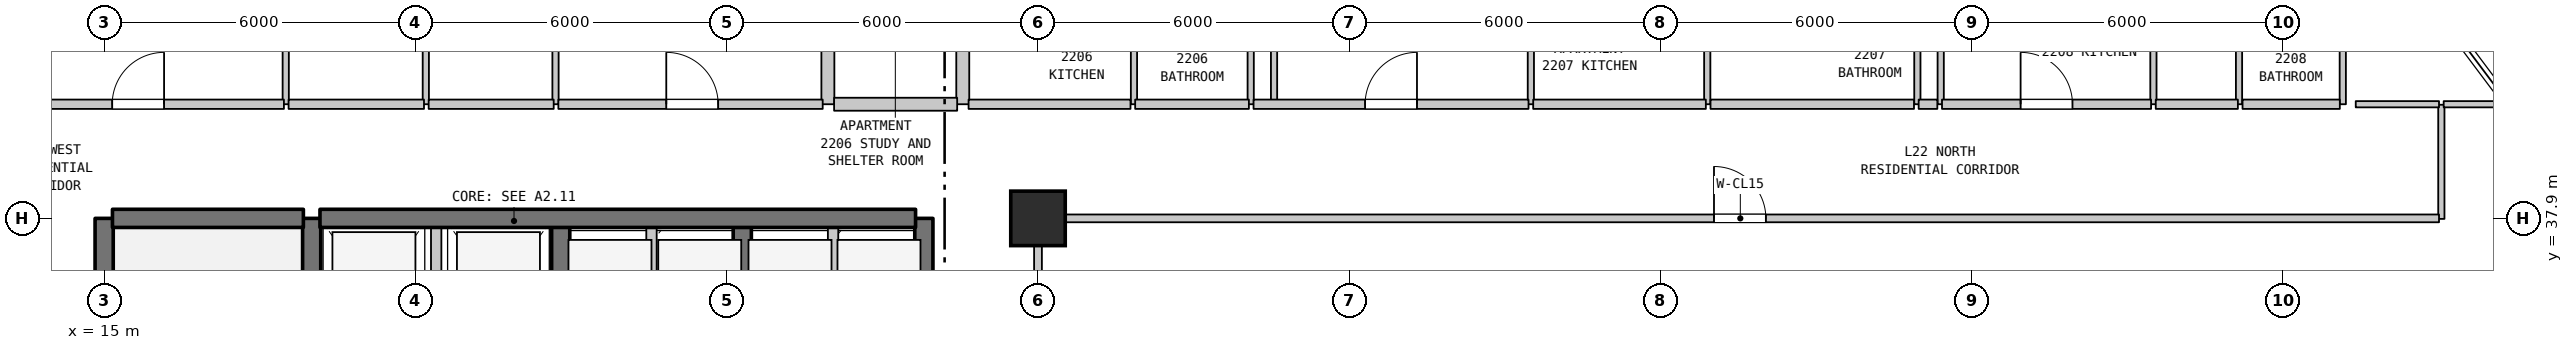
"""IFC4 building model, lengths in metres.
Left out: names, types, materials, properties, quantities, classifications, styles, units other than length and angle.
Written with IfcOpenShell. Run it as: python <this file> out.ifc"""

import sys

from ifc_helpers import new_model, si_unit, direction, frame, frame_2d, origin, origin_2d, place, context, subcontext, project, spatial, rectangle, extrude, element, fill, save


model = new_model("IFC4")
c1 = context("Model", 3, precision=1e-05, world=origin(), true_north=direction((0.0, 1.0)))
c2 = subcontext(c1, "Body", "Model", "MODEL_VIEW")
j1 = project(units=[si_unit("LENGTHUNIT", "METRE"), si_unit("PLANEANGLEUNIT", "RADIAN")], contexts=[c1])
p1 = place(None, origin())
s1 = spatial("IfcSite", under=j1, at=p1, CompositionType="ELEMENT")
p2 = place(p1, origin())
s2 = spatial("IfcBuilding", under=s1, at=p2, CompositionType="ELEMENT")
p3 = place(p2, frame((0.0, 0.0, 94.6)))
s3 = spatial("IfcBuildingStorey", under=s2, at=p3, CompositionType="ELEMENT", Elevation=94.6)
p4 = place(p3, frame((33.0, 37.9, 0.0), z_axis=(0.0, 0.0, 1.0), x_axis=(1.0, 0.0, 0.0)))
e1 = element("IfcColumn", 1, at=p4, inside=s3, PredefinedType="COLUMN", context=c2, shape_type="SweptSolid", body=[
    extrude(rectangle(XDim=1.05, YDim=1.05, at=origin_2d()), origin(), (0.0, 0.0, 1.0), 3.7),
])
p5 = place(p3, frame((15.0, 31.1, 0.0), z_axis=(0.0, 0.0, 1.0), x_axis=(0.0, 1.0, 0.0)))
e2 = element("IfcWall", 2, at=p5, inside=s3, PredefinedType="SHEAR", context=c2, shape_type="SweptSolid", body=[
    extrude(rectangle(XDim=6.8, YDim=0.35, at=frame_2d((3.4, 0.0))), origin(), (0.0, 0.0, 1.0), 3.385),
])
p6 = place(p3, frame((18.5, 40.1, 0.0), z_axis=(0.0, 0.0, 1.0), x_axis=(0.0, 1.0, 0.0)))
e3 = element("IfcWall", 3, at=p6, inside=s3, PredefinedType="PARTITIONING", context=c2, shape_type="SweptSolid", body=[
    extrude(rectangle(XDim=3.2, YDim=0.12, at=frame_2d((1.6, 0.0))), origin(), (0.0, 0.0, 1.0), 3.385),
])
p7 = place(p3, frame((19.0, 35.0, 0.0), z_axis=(0.0, 0.0, 1.0), x_axis=(0.0, 1.0, 0.0)))
e4 = element("IfcWall", 4, at=p7, inside=s3, PredefinedType="SHEAR", context=c2, shape_type="SweptSolid", body=[
    extrude(rectangle(XDim=2.9, YDim=0.35, at=frame_2d((1.45, 0.0))), origin(), (0.0, 0.0, 1.0), 3.385),
])
p8 = place(p3, frame((21.2, 40.1, 0.0), z_axis=(0.0, 0.0, 1.0), x_axis=(0.0, 1.0, 0.0)))
e5 = element("IfcWall", 5, at=p8, inside=s3, PredefinedType="PARTITIONING", context=c2, shape_type="SweptSolid", body=[
    extrude(rectangle(XDim=3.2, YDim=0.12, at=frame_2d((1.6, 0.0))), origin(), (0.0, 0.0, 1.0), 3.385),
])
p9 = place(p8, frame((1.15, 0.0, 0.0)))
e6 = element("IfcOpeningElement", 6, at=p9, cuts=e5, PredefinedType="OPENING", context=c2, shape_type="SweptSolid", body=[
    extrude(rectangle(XDim=0.9, YDim=2.15, at=frame_2d((0.45, 1.075))), frame((0.0, 0.07, 0.0), z_axis=(0.0, -1.0, 0.0), x_axis=(1.0, 0.0, 0.0)), (0.0, 0.0, 1.0), 0.14),
])
p10 = place(p3, frame((21.4, 35.0, 0.0), z_axis=(0.0, 0.0, 1.0), x_axis=(0.0, 1.0, 0.0)))
e7 = element("IfcWall", 7, at=p10, inside=s3, PredefinedType="STANDARD", context=c2, shape_type="SweptSolid", body=[
    extrude(rectangle(XDim=2.9, YDim=0.2, at=frame_2d((1.45, 0.0))), origin(), (0.0, 0.0, 1.0), 3.385),
])
p11 = place(p3, frame((23.7, 40.1, 0.0), z_axis=(0.0, 0.0, 1.0), x_axis=(0.0, 1.0, 0.0)))
e8 = element("IfcWall", 8, at=p11, inside=s3, PredefinedType="PARTITIONING", context=c2, shape_type="SweptSolid", body=[
    extrude(rectangle(XDim=2.05, YDim=0.12, at=frame_2d((1.025, 0.0))), origin(), (0.0, 0.0, 1.0), 3.385),
])
p12 = place(p3, frame((23.8, 35.0, 0.0), z_axis=(0.0, 0.0, 1.0), x_axis=(0.0, 1.0, 0.0)))
e9 = element("IfcWall", 9, at=p12, inside=s3, PredefinedType="SHEAR", context=c2, shape_type="SweptSolid", body=[
    extrude(rectangle(XDim=2.9, YDim=0.35, at=frame_2d((1.45, 0.0))), origin(), (0.0, 0.0, 1.0), 3.385),
])
p13 = place(p3, frame((25.55, 35.0, 0.0), z_axis=(0.0, 0.0, 1.0), x_axis=(0.0, 1.0, 0.0)))
e10 = element("IfcWall", 10, at=p13, inside=s3, PredefinedType="STANDARD", context=c2, shape_type="SweptSolid", body=[
    extrude(rectangle(XDim=2.9, YDim=0.2, at=frame_2d((1.45, 0.0))), origin(), (0.0, 0.0, 1.0), 3.385),
])
p14 = place(p3, frame((27.3, 35.0, 0.0), z_axis=(0.0, 0.0, 1.0), x_axis=(0.0, 1.0, 0.0)))
e11 = element("IfcWall", 11, at=p14, inside=s3, PredefinedType="SHEAR", context=c2, shape_type="SweptSolid", body=[
    extrude(rectangle(XDim=2.9, YDim=0.35, at=frame_2d((1.45, 0.0))), origin(), (0.0, 0.0, 1.0), 3.385),
])
p15 = place(p3, frame((28.95, 40.1, 0.0), z_axis=(0.0, 0.0, 1.0), x_axis=(0.0, 1.0, 0.0)))
e12 = element("IfcWall", 12, at=p15, inside=s3, PredefinedType="STANDARD", context=c2, shape_type="SweptSolid", body=[
    extrude(rectangle(XDim=2.3, YDim=0.25, at=frame_2d((1.15, 0.0))), origin(), (0.0, 0.0, 1.0), 3.385),
])
p16 = place(p3, frame((29.05, 35.0, 0.0), z_axis=(0.0, 0.0, 1.0), x_axis=(0.0, 1.0, 0.0)))
e13 = element("IfcWall", 13, at=p16, inside=s3, PredefinedType="STANDARD", context=c2, shape_type="SweptSolid", body=[
    extrude(rectangle(XDim=2.9, YDim=0.2, at=frame_2d((1.45, 0.0))), origin(), (0.0, 0.0, 1.0), 3.385),
])
p17 = place(p3, frame((30.8, 35.0, 0.0), z_axis=(0.0, 0.0, 1.0), x_axis=(0.0, 1.0, 0.0)))
e14 = element("IfcWall", 14, at=p17, inside=s3, PredefinedType="SHEAR", context=c2, shape_type="SweptSolid", body=[
    extrude(rectangle(XDim=2.9, YDim=0.35, at=frame_2d((1.45, 0.0))), origin(), (0.0, 0.0, 1.0), 3.385),
])
p18 = place(p3, frame((31.55, 40.1, 0.0), z_axis=(0.0, 0.0, 1.0), x_axis=(0.0, 1.0, 0.0)))
e15 = element("IfcWall", 15, at=p18, inside=s3, PredefinedType="STANDARD", context=c2, shape_type="SweptSolid", body=[
    extrude(rectangle(XDim=2.3, YDim=0.25, at=frame_2d((1.15, 0.0))), origin(), (0.0, 0.0, 1.0), 3.385),
])
p19 = place(p3, frame((33.0, 27.91, 0.0), z_axis=(0.0, 0.0, 1.0), x_axis=(0.0, 1.0, 0.0)))
e16 = element("IfcWall", 16, at=p19, inside=s3, PredefinedType="STANDARD", context=c2, shape_type="SweptSolid", body=[
    extrude(rectangle(XDim=9.98, YDim=0.15, at=frame_2d((4.99, 0.0))), origin(), (0.0, 0.0, 1.0), 2.885),
])
for number, where, z_axis, x_axis in (
    (17, (34.85, 40.1, 0.0), (0.0, 0.0, 1.0), (0.0, 1.0, 0.0)),
    (18, (37.1, 40.1, 0.0), (0.0, 0.0, 1.0), (0.0, 1.0, 0.0)),
):
    element("IfcWall", number, at=place(p3, frame(where, z_axis=z_axis, x_axis=x_axis)), inside=s3, PredefinedType="PARTITIONING", context=c2, shape_type="SweptSolid", body=[
        extrude(rectangle(XDim=2.3, YDim=0.12, at=frame_2d((1.15, 0.0))), origin(), (0.0, 0.0, 1.0), 3.385),
    ])
p20 = place(p3, frame((37.55, 40.1, 0.0), z_axis=(0.0, 0.0, 1.0), x_axis=(0.0, 1.0, 0.0)))
e19 = element("IfcWall", 19, at=p20, inside=s3, PredefinedType="PARTITIONING", context=c2, shape_type="SweptSolid", body=[
    extrude(rectangle(XDim=2.05, YDim=0.12, at=frame_2d((1.025, 0.0))), origin(), (0.0, 0.0, 1.0), 3.385),
])
for number, where, z_axis, x_axis in (
    (20, (42.5, 40.1, 0.0), (0.0, 0.0, 1.0), (0.0, 1.0, 0.0)),
    (21, (45.9, 40.1, 0.0), (0.0, 0.0, 1.0), (0.0, 1.0, 0.0)),
    (22, (49.95, 40.1, 0.0), (0.0, 0.0, 1.0), (0.0, 1.0, 0.0)),
):
    element("IfcWall", number, at=place(p3, frame(where, z_axis=z_axis, x_axis=x_axis)), inside=s3, PredefinedType="PARTITIONING", context=c2, shape_type="SweptSolid", body=[
        extrude(rectangle(XDim=2.3, YDim=0.12, at=frame_2d((1.15, 0.0))), origin(), (0.0, 0.0, 1.0), 3.385),
    ])
p21 = place(p3, frame((50.4, 40.1, 0.0), z_axis=(0.0, 0.0, 1.0), x_axis=(0.0, 1.0, 0.0)))
e23 = element("IfcWall", 23, at=p21, inside=s3, PredefinedType="PARTITIONING", context=c2, shape_type="SweptSolid", body=[
    extrude(rectangle(XDim=5.35, YDim=0.12, at=frame_2d((2.675, 0.0))), origin(), (0.0, 0.0, 1.0), 3.385),
])
for number, where, z_axis, x_axis in (
    (24, (54.5, 40.1, 0.0), (0.0, 0.0, 1.0), (0.0, 1.0, 0.0)),
    (25, (56.15, 40.1, 0.0), (0.0, 0.0, 1.0), (0.0, 1.0, 0.0)),
    (26, (58.15, 40.1, 0.0), (0.0, 0.0, 1.0), (0.0, 1.0, 0.0)),
):
    element("IfcWall", number, at=place(p3, frame(where, z_axis=z_axis, x_axis=x_axis)), inside=s3, PredefinedType="PARTITIONING", context=c2, shape_type="SweptSolid", body=[
        extrude(rectangle(XDim=2.3, YDim=0.12, at=frame_2d((1.15, 0.0))), origin(), (0.0, 0.0, 1.0), 3.385),
    ])
p22 = place(p3, frame((60.05, 37.89, 0.0), z_axis=(0.0, 0.0, 1.0), x_axis=(0.0, 1.0, 0.0)))
e27 = element("IfcWall", 27, at=p22, inside=s3, PredefinedType="PARTITIONING", context=c2, shape_type="SweptSolid", body=[
    extrude(rectangle(XDim=2.2, YDim=0.12, at=frame_2d((1.1, 0.0))), origin(), (0.0, 0.0, 1.0), 3.385),
])
p23 = place(p3, frame((15.16, 37.9, 0.0), z_axis=(0.0, 0.0, 1.0), x_axis=(1.0, 0.0, 0.0)))
e28 = element("IfcWall", 28, at=p23, inside=s3, PredefinedType="SHEAR", context=c2, shape_type="SweptSolid", body=[
    extrude(rectangle(XDim=3.68, YDim=0.35, at=frame_2d((1.84, 0.0))), origin(), (0.0, 0.0, 1.0), 3.385),
])
p24 = place(p3, frame((19.16, 37.9, 0.0), z_axis=(0.0, 0.0, 1.0), x_axis=(1.0, 0.0, 0.0)))
e29 = element("IfcWall", 29, at=p24, inside=s3, PredefinedType="SHEAR", context=c2, shape_type="SweptSolid", body=[
    extrude(rectangle(XDim=11.48, YDim=0.35, at=frame_2d((5.74, 0.0))), origin(), (0.0, 0.0, 1.0), 3.385),
])
p25 = place(p3, frame((33.07, 37.9, 0.0), z_axis=(0.0, 0.0, 1.0), x_axis=(1.0, 0.0, 0.0)))
e30 = element("IfcWall", 30, at=p25, inside=s3, PredefinedType="STANDARD", context=c2, shape_type="SweptSolid", body=[
    extrude(rectangle(XDim=26.935, YDim=0.15, at=frame_2d((13.467, 0.0))), origin(), (0.0, 0.0, 1.0), 3.385),
])
p26 = place(p25, frame((12.96, 0.0, 0.0)))
e31 = element("IfcOpeningElement", 31, at=p26, cuts=e30, PredefinedType="OPENING", context=c2, shape_type="SweptSolid", body=[
    extrude(rectangle(XDim=1.0, YDim=2.15, at=frame_2d((0.5, 1.075))), frame((0.0, 0.085, 0.0), z_axis=(0.0, -1.0, 0.0), x_axis=(1.0, 0.0, 0.0)), (0.0, 0.0, 1.0), 0.17),
])
p27 = place(p3, frame((12.875, 40.1, 0.0), z_axis=(0.0, 0.0, 1.0), x_axis=(1.0, 0.0, 0.0)))
e32 = element("IfcWall", 32, at=p27, inside=s3, PredefinedType="STANDARD", context=c2, shape_type="SweptSolid", body=[
    extrude(rectangle(XDim=5.59, YDim=0.18, at=frame_2d((2.795, 0.0))), origin(), (0.0, 0.0, 1.0), 3.385),
])
p28 = place(p27, frame((2.28, 0.0, 0.0)))
e33 = element("IfcOpeningElement", 33, at=p28, cuts=e32, PredefinedType="OPENING", context=c2, shape_type="SweptSolid", body=[
    extrude(rectangle(XDim=1.0, YDim=2.15, at=frame_2d((0.5, 1.075))), frame((0.0, 0.1, 0.0), z_axis=(0.0, -1.0, 0.0), x_axis=(1.0, 0.0, 0.0)), (0.0, 0.0, 1.0), 0.2),
])
p29 = place(p3, frame((18.555, 40.1, 0.0), z_axis=(0.0, 0.0, 1.0), x_axis=(1.0, 0.0, 0.0)))
e34 = element("IfcWall", 34, at=p29, inside=s3, PredefinedType="STANDARD", context=c2, shape_type="SweptSolid", body=[
    extrude(rectangle(XDim=2.61, YDim=0.18, at=frame_2d((1.305, 0.0))), origin(), (0.0, 0.0, 1.0), 3.385),
])
p30 = place(p3, frame((21.255, 40.1, 0.0), z_axis=(0.0, 0.0, 1.0), x_axis=(1.0, 0.0, 0.0)))
e35 = element("IfcWall", 35, at=p30, inside=s3, PredefinedType="STANDARD", context=c2, shape_type="SweptSolid", body=[
    extrude(rectangle(XDim=2.41, YDim=0.18, at=frame_2d((1.205, 0.0))), origin(), (0.0, 0.0, 1.0), 3.385),
])
p31 = place(p3, frame((23.755, 40.1, 0.0), z_axis=(0.0, 0.0, 1.0), x_axis=(1.0, 0.0, 0.0)))
e36 = element("IfcWall", 36, at=p31, inside=s3, PredefinedType="STANDARD", context=c2, shape_type="SweptSolid", body=[
    extrude(rectangle(XDim=5.095, YDim=0.18, at=frame_2d((2.548, 0.0))), origin(), (0.0, 0.0, 1.0), 3.385),
])
p32 = place(p31, frame((2.08, 0.0, 0.0)))
e37 = element("IfcOpeningElement", 37, at=p32, cuts=e36, PredefinedType="OPENING", context=c2, shape_type="SweptSolid", body=[
    extrude(rectangle(XDim=1.0, YDim=2.15, at=frame_2d((0.5, 1.075))), frame((0.0, 0.1, 0.0), z_axis=(0.0, -1.0, 0.0), x_axis=(1.0, 0.0, 0.0)), (0.0, 0.0, 1.0), 0.2),
])
p33 = place(p3, frame((29.07, 40.1, 0.0), z_axis=(0.0, 0.0, 1.0), x_axis=(1.0, 0.0, 0.0)))
e38 = element("IfcWall", 38, at=p33, inside=s3, PredefinedType="STANDARD", context=c2, shape_type="SweptSolid", body=[
    extrude(rectangle(XDim=2.372, YDim=0.25, at=frame_2d((1.186, 0.0))), origin(), (0.0, 0.0, 1.0), 3.385),
])
p34 = place(p3, frame((31.662, 40.1, 0.0), z_axis=(0.0, 0.0, 1.0), x_axis=(1.0, 0.0, 0.0)))
e39 = element("IfcWall", 39, at=p34, inside=s3, PredefinedType="STANDARD", context=c2, shape_type="SweptSolid", body=[
    extrude(rectangle(XDim=3.121, YDim=0.18, at=frame_2d((1.561, 0.0))), origin(), (0.0, 0.0, 1.0), 3.385),
])
p35 = place(p3, frame((34.873, 40.1, 0.0), z_axis=(0.0, 0.0, 1.0), x_axis=(1.0, 0.0, 0.0)))
e40 = element("IfcWall", 40, at=p35, inside=s3, PredefinedType="STANDARD", context=c2, shape_type="SweptSolid", body=[
    extrude(rectangle(XDim=2.192, YDim=0.18, at=frame_2d((1.096, 0.0))), origin(), (0.0, 0.0, 1.0), 3.385),
])
p36 = place(p3, frame((37.155, 40.1, 0.0), z_axis=(0.0, 0.0, 1.0), x_axis=(1.0, 0.0, 0.0)))
e41 = element("IfcWall", 41, at=p36, inside=s3, PredefinedType="STANDARD", context=c2, shape_type="SweptSolid", body=[
    extrude(rectangle(XDim=5.3, YDim=0.18, at=frame_2d((2.65, 0.0))), origin(), (0.0, 0.0, 1.0), 3.385),
])
p37 = place(p36, frame((2.15, 0.0, 0.0)))
e42 = element("IfcOpeningElement", 42, at=p37, cuts=e41, PredefinedType="OPENING", context=c2, shape_type="SweptSolid", body=[
    extrude(rectangle(XDim=1.0, YDim=2.15, at=frame_2d((0.5, 1.075))), frame((0.0, 0.1, 0.0), z_axis=(0.0, -1.0, 0.0), x_axis=(1.0, 0.0, 0.0)), (0.0, 0.0, 1.0), 0.2),
])
p38 = place(p3, frame((42.545, 40.1, 0.0), z_axis=(0.0, 0.0, 1.0), x_axis=(1.0, 0.0, 0.0)))
e43 = element("IfcWall", 43, at=p38, inside=s3, PredefinedType="STANDARD", context=c2, shape_type="SweptSolid", body=[
    extrude(rectangle(XDim=3.328, YDim=0.18, at=frame_2d((1.664, 0.0))), origin(), (0.0, 0.0, 1.0), 3.385),
])
p39 = place(p3, frame((45.963, 40.1, 0.0), z_axis=(0.0, 0.0, 1.0), x_axis=(1.0, 0.0, 0.0)))
e44 = element("IfcWall", 44, at=p39, inside=s3, PredefinedType="STANDARD", context=c2, shape_type="SweptSolid", body=[
    extrude(rectangle(XDim=3.922, YDim=0.18, at=frame_2d((1.961, 0.0))), origin(), (0.0, 0.0, 1.0), 3.385),
])
p40 = place(p3, frame((49.975, 40.1, 0.0), z_axis=(0.0, 0.0, 1.0), x_axis=(1.0, 0.0, 0.0)))
e45 = element("IfcWall", 45, at=p40, inside=s3, PredefinedType="STANDARD", context=c2, shape_type="SweptSolid", body=[
    extrude(rectangle(XDim=0.36, YDim=0.18, at=frame_2d((0.18, 0.0))), origin(), (0.0, 0.0, 1.0), 3.385),
])
p41 = place(p3, frame((50.425, 40.1, 0.0), z_axis=(0.0, 0.0, 1.0), x_axis=(1.0, 0.0, 0.0)))
e46 = element("IfcWall", 46, at=p41, inside=s3, PredefinedType="STANDARD", context=c2, shape_type="SweptSolid", body=[
    extrude(rectangle(XDim=4.03, YDim=0.18, at=frame_2d((2.015, 0.0))), origin(), (0.0, 0.0, 1.0), 3.385),
])
p42 = place(p41, frame((1.515, 0.0, 0.0)))
e47 = element("IfcOpeningElement", 47, at=p42, cuts=e46, PredefinedType="OPENING", context=c2, shape_type="SweptSolid", body=[
    extrude(rectangle(XDim=1.0, YDim=2.15, at=frame_2d((0.5, 1.075))), frame((0.0, 0.1, 0.0), z_axis=(0.0, -1.0, 0.0), x_axis=(1.0, 0.0, 0.0)), (0.0, 0.0, 1.0), 0.2),
])
p43 = place(p3, frame((54.545, 40.1, 0.0), z_axis=(0.0, 0.0, 1.0), x_axis=(1.0, 0.0, 0.0)))
e48 = element("IfcWall", 48, at=p43, inside=s3, PredefinedType="STANDARD", context=c2, shape_type="SweptSolid", body=[
    extrude(rectangle(XDim=1.583, YDim=0.18, at=frame_2d((0.792, 0.0))), origin(), (0.0, 0.0, 1.0), 3.385),
])
p44 = place(p3, frame((56.218, 40.1, 0.0), z_axis=(0.0, 0.0, 1.0), x_axis=(1.0, 0.0, 0.0)))
e49 = element("IfcWall", 49, at=p44, inside=s3, PredefinedType="STANDARD", context=c2, shape_type="SweptSolid", body=[
    extrude(rectangle(XDim=1.875, YDim=0.18, at=frame_2d((0.938, 0.0))), origin(), (0.0, 0.0, 1.0), 3.385),
])
p45 = place(p3, frame((58.4, 40.1, 0.0), z_axis=(0.0, 0.0, 1.0), x_axis=(1.0, 0.0, 0.0)))
e50 = element("IfcWall", 50, at=p45, inside=s3, PredefinedType="PARTITIONING", context=c2, shape_type="SweptSolid", body=[
    extrude(rectangle(XDim=1.605, YDim=0.12, at=frame_2d((0.802, 0.0))), origin(), (0.0, 0.0, 1.0), 3.385),
])
p46 = place(p3, frame((60.095, 40.1, 0.0), z_axis=(0.0, 0.0, 1.0), x_axis=(1.0, 0.0, 0.0)))
e51 = element("IfcWall", 51, at=p46, inside=s3, PredefinedType="PARTITIONING", context=c2, shape_type="SweptSolid", body=[
    extrude(rectangle(XDim=1.245, YDim=0.12, at=frame_2d((0.623, 0.0))), origin(), (0.0, 0.0, 1.0), 3.385),
])
p47 = place(p26, origin())
e52 = element("IfcDoor", 52, at=p47, inside=s3, OperationType="SINGLE_SWING_LEFT", PredefinedType="DOOR", context=c2, shape_type="SweptSolid", body=[
    extrude(rectangle(XDim=1.0, YDim=2.15, at=frame_2d((0.5, 1.075))), frame((0.0, 0.025, 0.0), z_axis=(0.0, -1.0, 0.0), x_axis=(1.0, 0.0, 0.0)), (0.0, 0.0, 1.0), 0.05),
])
fill(e31, e52)
p48 = place(p28, origin())
e53 = element("IfcDoor", 53, at=p48, inside=s3, OperationType="SINGLE_SWING_RIGHT", PredefinedType="DOOR", context=c2, shape_type="SweptSolid", body=[
    extrude(rectangle(XDim=1.0, YDim=2.15, at=frame_2d((0.5, 1.075))), frame((0.0, 0.025, 0.0), z_axis=(0.0, -1.0, 0.0), x_axis=(1.0, 0.0, 0.0)), (0.0, 0.0, 1.0), 0.05),
])
fill(e33, e53)
p49 = place(p32, origin())
e54 = element("IfcDoor", 54, at=p49, inside=s3, OperationType="SINGLE_SWING_LEFT", PredefinedType="DOOR", context=c2, shape_type="SweptSolid", body=[
    extrude(rectangle(XDim=1.0, YDim=2.15, at=frame_2d((0.5, 1.075))), frame((0.0, 0.025, 0.0), z_axis=(0.0, -1.0, 0.0), x_axis=(1.0, 0.0, 0.0)), (0.0, 0.0, 1.0), 0.05),
])
fill(e37, e54)
p50 = place(p37, origin())
e55 = element("IfcDoor", 55, at=p50, inside=s3, OperationType="SINGLE_SWING_RIGHT", PredefinedType="DOOR", context=c2, shape_type="SweptSolid", body=[
    extrude(rectangle(XDim=1.0, YDim=2.15, at=frame_2d((0.5, 1.075))), frame((0.0, 0.025, 0.0), z_axis=(0.0, -1.0, 0.0), x_axis=(1.0, 0.0, 0.0)), (0.0, 0.0, 1.0), 0.05),
])
fill(e42, e55)
p51 = place(p42, origin())
e56 = element("IfcDoor", 56, at=p51, inside=s3, OperationType="SINGLE_SWING_LEFT", PredefinedType="DOOR", context=c2, shape_type="SweptSolid", body=[
    extrude(rectangle(XDim=1.0, YDim=2.15, at=frame_2d((0.5, 1.075))), frame((0.0, 0.025, 0.0), z_axis=(0.0, -1.0, 0.0), x_axis=(1.0, 0.0, 0.0)), (0.0, 0.0, 1.0), 0.05),
])
fill(e47, e56)
save(model, sys.argv[1])
